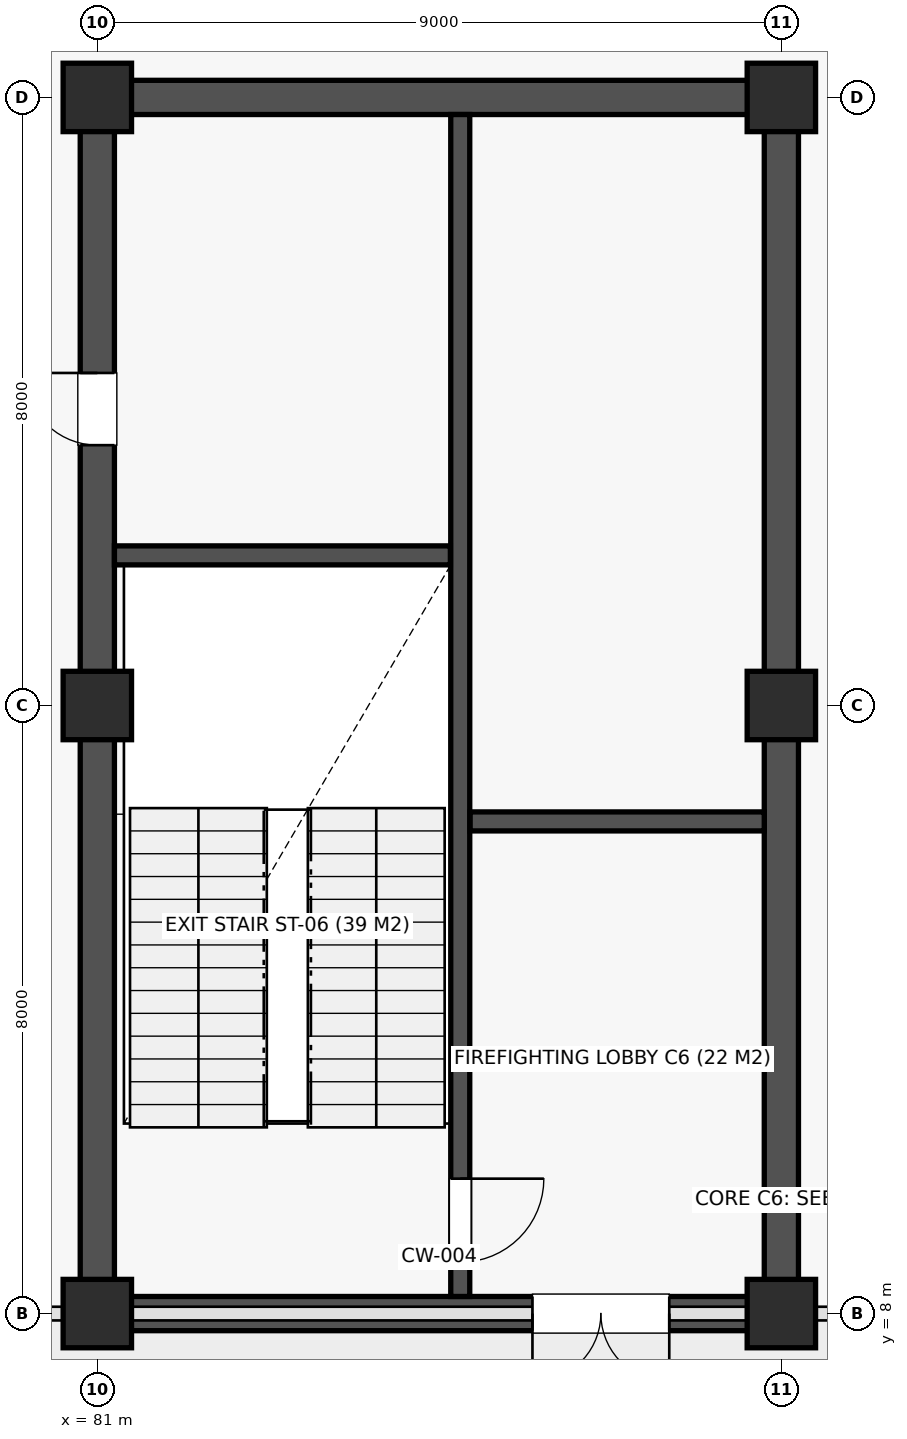
"""IFC4 building model, lengths in metres.
Left out: names, types, materials, properties, quantities, classifications, styles, units other than length and angle.
Written with IfcOpenShell. Run it as: python <this file> out.ifc"""

import sys

from ifc_helpers import new_model, si_unit, direction, frame, frame_2d, origin, origin_2d, place, context, subcontext, project, spatial, rectangle, extrude, element, fill, save


model = new_model("IFC4")
c1 = context("Model", 3, precision=1e-05, world=origin(), true_north=direction((0.0, 1.0)))
c2 = subcontext(c1, "Body", "Model", "MODEL_VIEW")
j1 = project(units=[si_unit("LENGTHUNIT", "METRE"), si_unit("PLANEANGLEUNIT", "RADIAN")], contexts=[c1])
p1 = place(None, origin())
s1 = spatial("IfcSite", under=j1, at=p1, CompositionType="ELEMENT")
p2 = place(p1, origin())
s2 = spatial("IfcBuilding", under=s1, at=p2, CompositionType="ELEMENT")
p3 = place(p2, origin())
s3 = spatial("IfcBuildingStorey", under=s2, at=p3, CompositionType="ELEMENT", Elevation=0.0)
for number, where, z_axis, x_axis in (
    (1, (81.0, 8.0, 0.0), (0.0, 0.0, 1.0), (1.0, 0.0, 0.0)),
    (2, (81.0, 16.0, 0.0), (0.0, 0.0, 1.0), (1.0, 0.0, 0.0)),
    (3, (81.0, 24.0, 0.0), (0.0, 0.0, 1.0), (1.0, 0.0, 0.0)),
    (4, (90.0, 8.0, 0.0), (0.0, 0.0, 1.0), (1.0, 0.0, 0.0)),
    (5, (90.0, 16.0, 0.0), (0.0, 0.0, 1.0), (1.0, 0.0, 0.0)),
    (6, (90.0, 24.0, 0.0), (0.0, 0.0, 1.0), (1.0, 0.0, 0.0)),
):
    element("IfcColumn", number, at=place(p3, frame(where, z_axis=z_axis, x_axis=x_axis)), inside=s3, PredefinedType="COLUMN", context=c2, shape_type="SweptSolid", body=[
        extrude(rectangle(XDim=0.9, YDim=0.9, at=origin_2d()), origin(), (0.0, 0.0, 1.0), 4.5),
    ])
p4 = place(p3, frame((81.225, 8.0, 0.0), z_axis=(0.0, 0.0, 1.0), x_axis=(1.0, 0.0, 0.0)))
e7 = element("IfcWall", 7, at=p4, inside=s3, PredefinedType="SHEAR", context=c2, shape_type="SweptSolid", body=[
    extrude(rectangle(XDim=8.55, YDim=0.45, at=frame_2d((4.275, 0.0))), origin(), (0.0, 0.0, 1.0), 3.45),
])
p5 = place(p4, frame((5.5, 0.0, 0.0)))
e8 = element("IfcOpeningElement", 8, at=p5, cuts=e7, PredefinedType="OPENING", context=c2, shape_type="SweptSolid", body=[
    extrude(rectangle(XDim=1.8, YDim=2.18, at=frame_2d((0.9, 1.09))), frame((0.0, 0.237, 0.0), z_axis=(0.0, -1.0, 0.0), x_axis=(1.0, 0.0, 0.0)), (0.0, 0.0, 1.0), 0.474),
])
p6 = place(p3, frame((81.225, 24.0, 0.0), z_axis=(0.0, 0.0, 1.0), x_axis=(1.0, 0.0, 0.0)))
e9 = element("IfcWall", 9, at=p6, inside=s3, PredefinedType="SHEAR", context=c2, shape_type="SweptSolid", body=[
    extrude(rectangle(XDim=8.55, YDim=0.45, at=frame_2d((4.275, 0.0))), origin(), (0.0, 0.0, 1.0), 3.45),
])
p7 = place(p3, frame((81.0, 8.225, 0.0), z_axis=(0.0, 0.0, 1.0), x_axis=(0.0, 1.0, 0.0)))
e10 = element("IfcWall", 10, at=p7, inside=s3, PredefinedType="SHEAR", context=c2, shape_type="SweptSolid", body=[
    extrude(rectangle(XDim=15.55, YDim=0.45, at=frame_2d((7.775, 0.0))), origin(), (0.0, 0.0, 1.0), 3.45),
])
p8 = place(p7, frame((11.2, 0.0, 0.0)))
e11 = element("IfcOpeningElement", 11, at=p8, cuts=e10, PredefinedType="OPENING", context=c2, shape_type="SweptSolid", body=[
    extrude(rectangle(XDim=0.95, YDim=2.1, at=frame_2d((0.475, 1.05))), frame((0.0, 0.237, 0.0), z_axis=(0.0, -1.0, 0.0), x_axis=(1.0, 0.0, 0.0)), (0.0, 0.0, 1.0), 0.474),
])
p9 = place(p3, frame((90.0, 8.225, 0.0), z_axis=(0.0, 0.0, 1.0), x_axis=(0.0, 1.0, 0.0)))
e12 = element("IfcWall", 12, at=p9, inside=s3, PredefinedType="SHEAR", context=c2, shape_type="SweptSolid", body=[
    extrude(rectangle(XDim=15.55, YDim=0.45, at=frame_2d((7.775, 0.0))), origin(), (0.0, 0.0, 1.0), 3.45),
])
p10 = place(p3, frame((85.775, 8.225, 0.0), z_axis=(0.0, 0.0, 1.0), x_axis=(0.0, 1.0, 0.0)))
e13 = element("IfcWall", 13, at=p10, inside=s3, PredefinedType="SOLIDWALL", context=c2, shape_type="SweptSolid", body=[
    extrude(rectangle(XDim=15.55, YDim=0.25, at=frame_2d((7.775, 0.0))), origin(), (0.0, 0.0, 1.0), 3.45),
])
p11 = place(p10, frame((0.45, 0.0, 0.0)))
e14 = element("IfcOpeningElement", 14, at=p11, cuts=e13, PredefinedType="OPENING", context=c2, shape_type="SweptSolid", body=[
    extrude(rectangle(XDim=1.1, YDim=2.15, at=frame_2d((0.55, 1.075))), frame((0.0, 0.137, 0.0), z_axis=(0.0, -1.0, 0.0), x_axis=(1.0, 0.0, 0.0)), (0.0, 0.0, 1.0), 0.274),
])
p12 = place(p3, frame((81.225, 17.975, 0.0), z_axis=(0.0, 0.0, 1.0), x_axis=(1.0, 0.0, 0.0)))
e15 = element("IfcWall", 15, at=p12, inside=s3, PredefinedType="SOLIDWALL", context=c2, shape_type="SweptSolid", body=[
    extrude(rectangle(XDim=4.42, YDim=0.25, at=frame_2d((2.21, 0.0))), origin(), (0.0, 0.0, 1.0), 3.45),
])
p13 = place(p3, frame((85.905, 14.475, 0.0), z_axis=(0.0, 0.0, 1.0), x_axis=(1.0, 0.0, 0.0)))
e16 = element("IfcWall", 16, at=p13, inside=s3, PredefinedType="SOLIDWALL", context=c2, shape_type="SweptSolid", body=[
    extrude(rectangle(XDim=3.87, YDim=0.25, at=frame_2d((1.935, 0.0))), origin(), (0.0, 0.0, 1.0), 3.45),
])
p14 = place(p5, frame((1.8, 0.0, 0.0), z_axis=(0.0, 0.0, 1.0), x_axis=(-1.0, 0.0, 0.0)))
e17 = element("IfcDoor", 17, at=p14, inside=s3, OperationType="DOUBLE_DOOR_SINGLE_SWING", PredefinedType="DOOR", context=c2, shape_type="SweptSolid", body=[
    extrude(rectangle(XDim=1.8, YDim=2.18, at=frame_2d((0.9, 1.09))), frame((0.0, 0.025, 0.0), z_axis=(0.0, -1.0, 0.0), x_axis=(1.0, 0.0, 0.0)), (0.0, 0.0, 1.0), 0.05),
])
fill(e8, e17)
p15 = place(p11, frame((1.1, 0.0, 0.0), z_axis=(0.0, 0.0, 1.0), x_axis=(-1.0, 0.0, 0.0)))
e18 = element("IfcDoor", 18, at=p15, inside=s3, OperationType="SINGLE_SWING_LEFT", PredefinedType="DOOR", context=c2, shape_type="SweptSolid", body=[
    extrude(rectangle(XDim=1.1, YDim=2.15, at=frame_2d((0.55, 1.075))), frame((0.0, 0.025, 0.0), z_axis=(0.0, -1.0, 0.0), x_axis=(1.0, 0.0, 0.0)), (0.0, 0.0, 1.0), 0.05),
])
fill(e14, e18)
p16 = place(p8, origin())
e19 = element("IfcDoor", 19, at=p16, inside=s3, OperationType="SINGLE_SWING_RIGHT", PredefinedType="DOOR", context=c2, shape_type="SweptSolid", body=[
    extrude(rectangle(XDim=0.95, YDim=2.1, at=frame_2d((0.475, 1.05))), frame((0.0, 0.025, 0.0), z_axis=(0.0, -1.0, 0.0), x_axis=(1.0, 0.0, 0.0)), (0.0, 0.0, 1.0), 0.05),
])
fill(e11, e19)
save(model, sys.argv[1])
